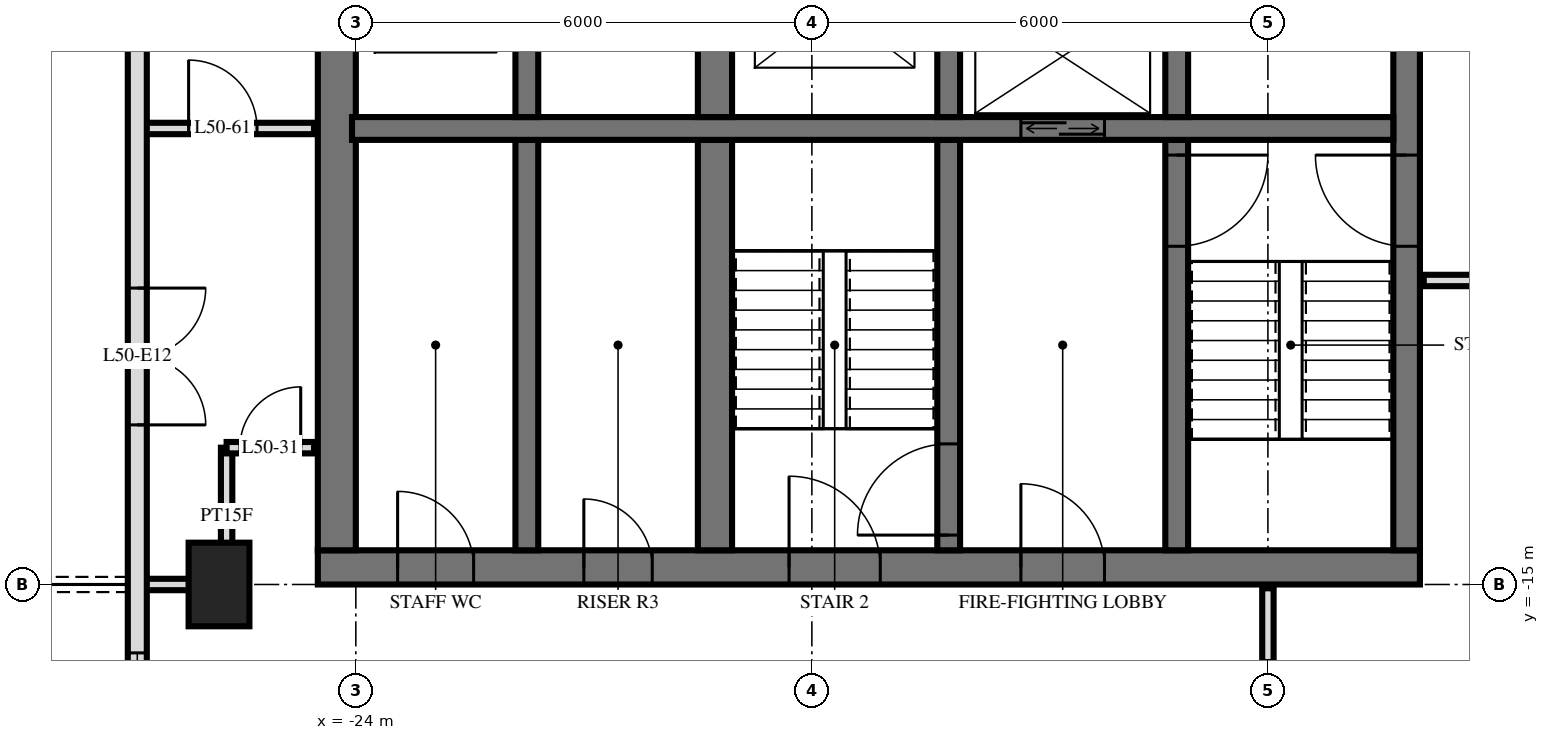
"""IFC4 building model, lengths in metres.
Left out: names, types, materials, properties, quantities, classifications, styles, units other than length and angle.
Written with IfcOpenShell. Run it as: python <this file> out.ifc"""

import sys

from ifc_helpers import new_model, si_unit, direction, frame, frame_2d, origin, origin_2d, place, context, subcontext, project, spatial, rectangle, extrude, element, fill, save


model = new_model("IFC4")
c1 = context("Model", 3, precision=1e-05, world=origin(), true_north=direction((0.0, 1.0)))
c2 = subcontext(c1, "Body", "Model", "MODEL_VIEW")
j1 = project(units=[si_unit("LENGTHUNIT", "METRE"), si_unit("PLANEANGLEUNIT", "RADIAN")], contexts=[c1])
p1 = place(None, origin())
s1 = spatial("IfcSite", under=j1, at=p1, CompositionType="ELEMENT")
p2 = place(p1, origin())
s2 = spatial("IfcBuilding", under=s1, at=p2, CompositionType="ELEMENT")
p3 = place(p2, frame((0.0, 0.0, 194.1)))
s3 = spatial("IfcBuildingStorey", under=s2, at=p3, CompositionType="ELEMENT", Elevation=194.1)
p4 = place(p3, frame((-25.8, -15.0, 0.0), z_axis=(0.0, 0.0, 1.0), x_axis=(0.0, 1.0, 0.0)))
e1 = element("IfcColumn", 1, at=p4, inside=s3, PredefinedType="COLUMN", context=c2, shape_type="SweptSolid", body=[
    extrude(rectangle(XDim=1.1, YDim=0.8, at=origin_2d()), origin(), (0.0, 0.0, 1.0), 3.5),
])
p5 = place(p3, frame((-24.5, -14.775, 0.0), z_axis=(0.0, 0.0, 1.0), x_axis=(1.0, 0.0, 0.0)))
e2 = element("IfcWall", 2, at=p5, inside=s3, PredefinedType="SHEAR", context=c2, shape_type="SweptSolid", body=[
    extrude(rectangle(XDim=14.5, YDim=0.45, at=frame_2d((7.25, 0.0))), origin(), (0.0, 0.0, 1.0), 3.5),
])
p6 = place(p5, frame((6.2, 0.0, 0.0)))
e3 = element("IfcOpeningElement", 3, at=p6, cuts=e2, PredefinedType="OPENING", context=c2, shape_type="SweptSolid", body=[
    extrude(rectangle(XDim=1.2, YDim=2.1, at=frame_2d((0.6, 1.05))), frame((0.0, 0.235, 0.0), z_axis=(0.0, -1.0, 0.0), x_axis=(1.0, 0.0, 0.0)), (0.0, 0.0, 1.0), 0.47),
])
p7 = place(p5, frame((9.25, 0.0, 0.0)))
e4 = element("IfcOpeningElement", 4, at=p7, cuts=e2, PredefinedType="OPENING", context=c2, shape_type="SweptSolid", body=[
    extrude(rectangle(XDim=1.1, YDim=2.1, at=frame_2d((0.55, 1.05))), frame((0.0, 0.235, 0.0), z_axis=(0.0, -1.0, 0.0), x_axis=(1.0, 0.0, 0.0)), (0.0, 0.0, 1.0), 0.47),
])
p8 = place(p5, frame((3.5, 0.0, 0.0)))
e5 = element("IfcOpeningElement", 5, at=p8, cuts=e2, PredefinedType="OPENING", context=c2, shape_type="SweptSolid", body=[
    extrude(rectangle(XDim=0.9, YDim=2.1, at=frame_2d((0.45, 1.05))), frame((0.0, 0.235, 0.0), z_axis=(0.0, -1.0, 0.0), x_axis=(1.0, 0.0, 0.0)), (0.0, 0.0, 1.0), 0.47),
])
p9 = place(p5, frame((1.05, 0.0, 0.0)))
e6 = element("IfcOpeningElement", 6, at=p9, cuts=e2, PredefinedType="OPENING", context=c2, shape_type="SweptSolid", body=[
    extrude(rectangle(XDim=1.0, YDim=2.1, at=frame_2d((0.5, 1.05))), frame((0.0, 0.235, 0.0), z_axis=(0.0, -1.0, 0.0), x_axis=(1.0, 0.0, 0.0)), (0.0, 0.0, 1.0), 0.47),
])
p10 = place(p3, frame((-10.175, -14.55, 0.0), z_axis=(0.0, 0.0, 1.0), x_axis=(0.0, 1.0, 0.0)))
e7 = element("IfcWall", 7, at=p10, inside=s3, PredefinedType="SHEAR", context=c2, shape_type="SweptSolid", body=[
    extrude(rectangle(XDim=14.1, YDim=0.35, at=frame_2d((7.05, 0.0))), origin(), (0.0, 0.0, 1.0), 3.5),
])
p11 = place(p10, frame((8.4, 0.0, 0.0)))
e8 = element("IfcOpeningElement", 8, at=p11, cuts=e7, PredefinedType="OPENING", context=c2, shape_type="SweptSolid", body=[
    extrude(rectangle(XDim=1.4, YDim=2.4, at=frame_2d((0.7, 1.2))), frame((0.0, 0.185, 0.0), z_axis=(0.0, -1.0, 0.0), x_axis=(1.0, 0.0, 0.0)), (0.0, 0.0, 1.0), 0.37),
])
p12 = place(p10, frame((10.0, 0.0, 0.0)))
e9 = element("IfcOpeningElement", 9, at=p12, cuts=e7, PredefinedType="OPENING", context=c2, shape_type="SweptSolid", body=[
    extrude(rectangle(XDim=1.4, YDim=2.4, at=frame_2d((0.7, 1.2))), frame((0.0, 0.185, 0.0), z_axis=(0.0, -1.0, 0.0), x_axis=(1.0, 0.0, 0.0)), (0.0, 0.0, 1.0), 0.37),
])
p13 = place(p10, frame((4.0, 0.0, 0.0)))
e10 = element("IfcOpeningElement", 10, at=p13, cuts=e7, PredefinedType="OPENING", context=c2, shape_type="SweptSolid", body=[
    extrude(rectangle(XDim=1.2, YDim=2.1, at=frame_2d((0.6, 1.05))), frame((0.0, 0.185, 0.0), z_axis=(0.0, -1.0, 0.0), x_axis=(1.0, 0.0, 0.0)), (0.0, 0.0, 1.0), 0.37),
])
p14 = place(p3, frame((-24.25, -14.55, 0.0), z_axis=(0.0, 0.0, 1.0), x_axis=(0.0, 1.0, 0.0)))
e11 = element("IfcWall", 11, at=p14, inside=s3, PredefinedType="SHEAR", context=c2, shape_type="SweptSolid", body=[
    extrude(rectangle(XDim=14.1, YDim=0.5, at=frame_2d((7.05, 0.0))), origin(), (0.0, 0.0, 1.0), 3.5),
])
p15 = place(p3, frame((-24.05, -9.0, 0.0), z_axis=(0.0, 0.0, 1.0), x_axis=(1.0, 0.0, 0.0)))
e12 = element("IfcWall", 12, at=p15, inside=s3, PredefinedType="SHEAR", context=c2, shape_type="SweptSolid", body=[
    extrude(rectangle(XDim=13.7, YDim=0.3, at=frame_2d((6.85, 0.0))), origin(), (0.0, 0.0, 1.0), 3.5),
])
p16 = place(p15, frame((8.8, 0.0, 0.0)))
e13 = element("IfcOpeningElement", 13, at=p16, cuts=e12, PredefinedType="OPENING", context=c2, shape_type="SweptSolid", body=[
    extrude(rectangle(XDim=1.1, YDim=2.1, at=frame_2d((0.55, 1.05))), frame((0.0, 0.16, 0.0), z_axis=(0.0, -1.0, 0.0), x_axis=(1.0, 0.0, 0.0)), (0.0, 0.0, 1.0), 0.32),
])
p17 = place(p3, frame((-13.2, -8.85, 0.0), z_axis=(0.0, 0.0, 1.0), x_axis=(0.0, 1.0, 0.0)))
e14 = element("IfcWall", 14, at=p17, inside=s3, PredefinedType="SHEAR", context=c2, shape_type="SweptSolid", body=[
    extrude(rectangle(XDim=2.3, YDim=0.3, at=frame_2d((1.15, 0.0))), origin(), (0.0, 0.0, 1.0), 3.5),
])
p18 = place(p3, frame((-13.2, -14.55, 0.0), z_axis=(0.0, 0.0, 1.0), x_axis=(0.0, 1.0, 0.0)))
e15 = element("IfcWall", 15, at=p18, inside=s3, PredefinedType="SHEAR", context=c2, shape_type="SweptSolid", body=[
    extrude(rectangle(XDim=5.4, YDim=0.3, at=frame_2d((2.7, 0.0))), origin(), (0.0, 0.0, 1.0), 3.5),
])
p19 = place(p18, frame((4.0, 0.0, 0.0)))
e16 = element("IfcOpeningElement", 16, at=p19, cuts=e15, PredefinedType="OPENING", context=c2, shape_type="SweptSolid", body=[
    extrude(rectangle(XDim=1.2, YDim=2.1, at=frame_2d((0.6, 1.05))), frame((0.0, 0.16, 0.0), z_axis=(0.0, -1.0, 0.0), x_axis=(1.0, 0.0, 0.0)), (0.0, 0.0, 1.0), 0.32),
])
p20 = place(p3, frame((-16.2, -8.85, 0.0), z_axis=(0.0, 0.0, 1.0), x_axis=(0.0, 1.0, 0.0)))
e17 = element("IfcWall", 17, at=p20, inside=s3, PredefinedType="SHEAR", context=c2, shape_type="SweptSolid", body=[
    extrude(rectangle(XDim=2.3, YDim=0.3, at=frame_2d((1.15, 0.0))), origin(), (0.0, 0.0, 1.0), 3.5),
])
p21 = place(p3, frame((-16.2, -14.55, 0.0), z_axis=(0.0, 0.0, 1.0), x_axis=(0.0, 1.0, 0.0)))
e18 = element("IfcWall", 18, at=p21, inside=s3, PredefinedType="SHEAR", context=c2, shape_type="SweptSolid", body=[
    extrude(rectangle(XDim=5.4, YDim=0.3, at=frame_2d((2.7, 0.0))), origin(), (0.0, 0.0, 1.0), 3.5),
])
p22 = place(p21, frame((0.2, 0.0, 0.0)))
e19 = element("IfcOpeningElement", 19, at=p22, cuts=e18, PredefinedType="OPENING", context=c2, shape_type="SweptSolid", body=[
    extrude(rectangle(XDim=1.2, YDim=2.1, at=frame_2d((0.6, 1.05))), frame((0.0, 0.16, 0.0), z_axis=(0.0, -1.0, 0.0), x_axis=(1.0, 0.0, 0.0)), (0.0, 0.0, 1.0), 0.32),
])
p23 = place(p3, frame((-19.275, -8.85, 0.0), z_axis=(0.0, 0.0, 1.0), x_axis=(0.0, 1.0, 0.0)))
e20 = element("IfcWall", 20, at=p23, inside=s3, PredefinedType="SHEAR", context=c2, shape_type="SweptSolid", body=[
    extrude(rectangle(XDim=2.3, YDim=0.45, at=frame_2d((1.15, 0.0))), origin(), (0.0, 0.0, 1.0), 3.5),
])
p24 = place(p3, frame((-19.275, -14.55, 0.0), z_axis=(0.0, 0.0, 1.0), x_axis=(0.0, 1.0, 0.0)))
e21 = element("IfcWall", 21, at=p24, inside=s3, PredefinedType="SHEAR", context=c2, shape_type="SweptSolid", body=[
    extrude(rectangle(XDim=5.4, YDim=0.45, at=frame_2d((2.7, 0.0))), origin(), (0.0, 0.0, 1.0), 3.5),
])
p25 = place(p3, frame((-21.75, -8.85, 0.0), z_axis=(0.0, 0.0, 1.0), x_axis=(0.0, 1.0, 0.0)))
e22 = element("IfcWall", 22, at=p25, inside=s3, PredefinedType="SHEAR", context=c2, shape_type="SweptSolid", body=[
    extrude(rectangle(XDim=2.3, YDim=0.3, at=frame_2d((1.15, 0.0))), origin(), (0.0, 0.0, 1.0), 3.5),
])
p26 = place(p3, frame((-21.75, -14.55, 0.0), z_axis=(0.0, 0.0, 1.0), x_axis=(0.0, 1.0, 0.0)))
e23 = element("IfcWall", 23, at=p26, inside=s3, PredefinedType="SHEAR", context=c2, shape_type="SweptSolid", body=[
    extrude(rectangle(XDim=5.4, YDim=0.3, at=frame_2d((2.7, 0.0))), origin(), (0.0, 0.0, 1.0), 3.5),
])
p27 = place(p3, frame((-26.875, -3.325, 0.0), z_axis=(0.0, 0.0, 1.0), x_axis=(0.0, -1.0, 0.0)))
e24 = element("IfcWall", 24, at=p27, inside=s3, PredefinedType="SOLIDWALL", context=c2, shape_type="SweptSolid", body=[
    extrude(rectangle(XDim=21.551, YDim=0.25, at=frame_2d((10.775, 0.0))), origin(), (0.0, 0.0, 1.0), 3.22),
])
p28 = place(p27, frame((7.775, 0.0, 0.0)))
e25 = element("IfcOpeningElement", 25, at=p28, cuts=e24, PredefinedType="OPENING", context=c2, shape_type="SweptSolid", body=[
    extrude(rectangle(XDim=1.8, YDim=2.4, at=frame_2d((0.9, 1.2))), frame((0.0, 0.135, 0.0), z_axis=(0.0, -1.0, 0.0), x_axis=(1.0, 0.0, 0.0)), (0.0, 0.0, 1.0), 0.27),
])
p29 = place(p27, frame((12.575, 0.0, 0.9)))
e26 = element("IfcOpeningElement", 26, at=p29, cuts=e24, PredefinedType="OPENING", context=c2, shape_type="SweptSolid", body=[
    extrude(rectangle(XDim=1.2, YDim=1.5, at=frame_2d((0.6, 0.75))), frame((0.0, 0.135, 0.0), z_axis=(0.0, -1.0, 0.0), x_axis=(1.0, 0.0, 0.0)), (0.0, 0.0, 1.0), 0.27),
])
p30 = place(p27, frame((15.275, 0.0, 0.0)))
e27 = element("IfcOpeningElement", 27, at=p30, cuts=e24, PredefinedType="OPENING", context=c2, shape_type="SweptSolid", body=[
    extrude(rectangle(XDim=1.8, YDim=2.4, at=frame_2d((0.9, 1.2))), frame((0.0, 0.135, 0.0), z_axis=(0.0, -1.0, 0.0), x_axis=(1.0, 0.0, 0.0)), (0.0, 0.0, 1.0), 0.27),
])
p31 = place(p27, frame((19.325, 0.0, 0.0)))
e28 = element("IfcOpeningElement", 28, at=p31, cuts=e24, PredefinedType="OPENING", context=c2, shape_type="SweptSolid", body=[
    extrude(rectangle(XDim=1.8, YDim=2.4, at=frame_2d((0.9, 1.2))), frame((0.0, 0.135, 0.0), z_axis=(0.0, -1.0, 0.0), x_axis=(1.0, 0.0, 0.0)), (0.0, 0.0, 1.0), 0.27),
])
p32 = place(p3, frame((-12.0, -18.0, 0.0), z_axis=(0.0, 0.0, 1.0), x_axis=(0.0, 1.0, 0.0)))
e29 = element("IfcWall", 29, at=p32, inside=s3, PredefinedType="PARTITIONING", context=c2, shape_type="SweptSolid", body=[
    extrude(rectangle(XDim=2.95, YDim=0.15, at=frame_2d((1.475, 0.0))), origin(), (0.0, 0.0, 1.0), 3.22),
])
p33 = place(p32, frame((1.0, 0.0, 0.0)))
e30 = element("IfcOpeningElement", 30, at=p33, cuts=e29, PredefinedType="OPENING", context=c2, shape_type="SweptSolid", body=[
    extrude(rectangle(XDim=1.0, YDim=2.1, at=frame_2d((0.5, 1.05))), frame((0.0, 0.085, 0.0), z_axis=(0.0, -1.0, 0.0), x_axis=(1.0, 0.0, 0.0)), (0.0, 0.0, 1.0), 0.17),
])
p34 = place(p3, frame((-25.7, -15.0, 0.0), z_axis=(0.0, 0.0, 1.0), x_axis=(0.0, 1.0, 0.0)))
e31 = element("IfcWall", 31, at=p34, inside=s3, PredefinedType="PARTITIONING", context=c2, shape_type="SweptSolid", body=[
    extrude(rectangle(XDim=1.8, YDim=0.15, at=frame_2d((0.9, 0.0))), origin(), (0.0, 0.0, 1.0), 3.22),
])
p35 = place(p3, frame((-26.82, -15.0, 0.0), z_axis=(0.0, 0.0, 1.0), x_axis=(1.0, 0.0, 0.0)))
e32 = element("IfcWall", 32, at=p35, inside=s3, PredefinedType="PARTITIONING", context=c2, shape_type="SweptSolid", body=[
    extrude(rectangle(XDim=1.12, YDim=0.15, at=frame_2d((0.56, 0.0))), origin(), (0.0, 0.0, 1.0), 3.22),
])
p36 = place(p3, frame((-25.7, -13.2, 0.0), z_axis=(0.0, 0.0, 1.0), x_axis=(1.0, 0.0, 0.0)))
e33 = element("IfcWall", 33, at=p36, inside=s3, PredefinedType="PARTITIONING", context=c2, shape_type="SweptSolid", body=[
    extrude(rectangle(XDim=1.15, YDim=0.15, at=frame_2d((0.575, 0.0))), origin(), (0.0, 0.0, 1.0), 3.22),
])
p37 = place(p36, frame((0.175, 0.0, 0.0)))
e34 = element("IfcOpeningElement", 34, at=p37, cuts=e33, PredefinedType="OPENING", context=c2, shape_type="SweptSolid", body=[
    extrude(rectangle(XDim=0.8, YDim=2.1, at=frame_2d((0.4, 1.05))), frame((0.0, 0.085, 0.0), z_axis=(0.0, -1.0, 0.0), x_axis=(1.0, 0.0, 0.0)), (0.0, 0.0, 1.0), 0.17),
])
p38 = place(p3, frame((-9.95, -11.0, 0.0), z_axis=(0.0, 0.0, 1.0), x_axis=(1.0, 0.0, 0.0)))
e35 = element("IfcWall", 35, at=p38, inside=s3, PredefinedType="PARTITIONING", context=c2, shape_type="SweptSolid", body=[
    extrude(rectangle(XDim=19.9, YDim=0.15, at=frame_2d((9.95, 0.0))), origin(), (0.0, 0.0, 1.0), 3.22),
])
p39 = place(p38, frame((9.45, 0.0, 0.0)))
e36 = element("IfcOpeningElement", 36, at=p39, cuts=e35, PredefinedType="OPENING", context=c2, shape_type="SweptSolid", body=[
    extrude(rectangle(XDim=1.0, YDim=2.1, at=frame_2d((0.5, 1.05))), frame((0.0, 0.085, 0.0), z_axis=(0.0, -1.0, 0.0), x_axis=(1.0, 0.0, 0.0)), (0.0, 0.0, 1.0), 0.17),
])
p40 = place(p38, frame((3.45, 0.0, 0.0)))
e37 = element("IfcOpeningElement", 37, at=p40, cuts=e35, PredefinedType="OPENING", context=c2, shape_type="SweptSolid", body=[
    extrude(rectangle(XDim=1.0, YDim=2.1, at=frame_2d((0.5, 1.05))), frame((0.0, 0.085, 0.0), z_axis=(0.0, -1.0, 0.0), x_axis=(1.0, 0.0, 0.0)), (0.0, 0.0, 1.0), 0.17),
])
p41 = place(p3, frame((-26.82, -9.0, 0.0), z_axis=(0.0, 0.0, 1.0), x_axis=(1.0, 0.0, 0.0)))
e38 = element("IfcWall", 38, at=p41, inside=s3, PredefinedType="PARTITIONING", context=c2, shape_type="SweptSolid", body=[
    extrude(rectangle(XDim=2.27, YDim=0.15, at=frame_2d((1.135, 0.0))), origin(), (0.0, 0.0, 1.0), 3.22),
])
p42 = place(p41, frame((0.62, 0.0, 0.0)))
e39 = element("IfcOpeningElement", 39, at=p42, cuts=e38, PredefinedType="OPENING", context=c2, shape_type="SweptSolid", body=[
    extrude(rectangle(XDim=0.9, YDim=2.1, at=frame_2d((0.45, 1.05))), frame((0.0, 0.085, 0.0), z_axis=(0.0, -1.0, 0.0), x_axis=(1.0, 0.0, 0.0)), (0.0, 0.0, 1.0), 0.17),
])
p43 = place(p28, origin())
e40 = element("IfcDoor", 40, at=p43, inside=s3, OperationType="DOUBLE_DOOR_SINGLE_SWING", PredefinedType="DOOR", context=c2, shape_type="SweptSolid", body=[
    extrude(rectangle(XDim=1.8, YDim=2.4, at=frame_2d((0.9, 1.2))), frame((0.0, 0.025, 0.0), z_axis=(0.0, -1.0, 0.0), x_axis=(1.0, 0.0, 0.0)), (0.0, 0.0, 1.0), 0.05),
])
fill(e25, e40)
p44 = place(p29, origin())
e41 = element("IfcWindow", 41, at=p44, inside=s3, PartitioningType="SINGLE_PANEL", PredefinedType="WINDOW", context=c2, shape_type="SweptSolid", body=[
    extrude(rectangle(XDim=1.2, YDim=1.5, at=frame_2d((0.6, 0.75))), frame((0.0, 0.03, 0.0), z_axis=(0.0, -1.0, 0.0), x_axis=(1.0, 0.0, 0.0)), (0.0, 0.0, 1.0), 0.06),
])
fill(e26, e41)
p45 = place(p16, origin())
e42 = element("IfcDoor", 42, at=p45, inside=s3, OperationType="DOUBLE_DOOR_SLIDING", PredefinedType="USERDEFINED", context=c2, shape_type="SweptSolid", body=[
    extrude(rectangle(XDim=1.1, YDim=2.1, at=frame_2d((0.55, 1.05))), frame((0.0, 0.025, 0.0), z_axis=(0.0, -1.0, 0.0), x_axis=(1.0, 0.0, 0.0)), (0.0, 0.0, 1.0), 0.05),
])
fill(e13, e42)
p46 = place(p13, origin())
e43 = element("IfcDoor", 43, at=p46, inside=s3, OperationType="SINGLE_SWING_LEFT", PredefinedType="DOOR", context=c2, shape_type="SweptSolid", body=[
    extrude(rectangle(XDim=1.2, YDim=2.1, at=frame_2d((0.6, 1.05))), frame((0.0, 0.025, 0.0), z_axis=(0.0, -1.0, 0.0), x_axis=(1.0, 0.0, 0.0)), (0.0, 0.0, 1.0), 0.05),
])
fill(e10, e43)
p47 = place(p6, origin())
e44 = element("IfcDoor", 44, at=p47, inside=s3, OperationType="SINGLE_SWING_RIGHT", PredefinedType="DOOR", context=c2, shape_type="SweptSolid", body=[
    extrude(rectangle(XDim=1.2, YDim=2.1, at=frame_2d((0.6, 1.05))), frame((0.0, 0.025, 0.0), z_axis=(0.0, -1.0, 0.0), x_axis=(1.0, 0.0, 0.0)), (0.0, 0.0, 1.0), 0.05),
])
fill(e3, e44)
p48 = place(p7, origin())
e45 = element("IfcDoor", 45, at=p48, inside=s3, OperationType="SINGLE_SWING_RIGHT", PredefinedType="DOOR", context=c2, shape_type="SweptSolid", body=[
    extrude(rectangle(XDim=1.1, YDim=2.1, at=frame_2d((0.55, 1.05))), frame((0.0, 0.025, 0.0), z_axis=(0.0, -1.0, 0.0), x_axis=(1.0, 0.0, 0.0)), (0.0, 0.0, 1.0), 0.05),
])
fill(e4, e45)
p49 = place(p8, origin())
e46 = element("IfcDoor", 46, at=p49, inside=s3, OperationType="SINGLE_SWING_RIGHT", PredefinedType="DOOR", context=c2, shape_type="SweptSolid", body=[
    extrude(rectangle(XDim=0.9, YDim=2.1, at=frame_2d((0.45, 1.05))), frame((0.0, 0.025, 0.0), z_axis=(0.0, -1.0, 0.0), x_axis=(1.0, 0.0, 0.0)), (0.0, 0.0, 1.0), 0.05),
])
fill(e5, e46)
p50 = place(p9, origin())
e47 = element("IfcDoor", 47, at=p50, inside=s3, OperationType="SINGLE_SWING_RIGHT", PredefinedType="DOOR", context=c2, shape_type="SweptSolid", body=[
    extrude(rectangle(XDim=1.0, YDim=2.1, at=frame_2d((0.5, 1.05))), frame((0.0, 0.025, 0.0), z_axis=(0.0, -1.0, 0.0), x_axis=(1.0, 0.0, 0.0)), (0.0, 0.0, 1.0), 0.05),
])
fill(e6, e47)
p51 = place(p19, frame((0.6, 0.0, 0.0), z_axis=(0.0, 0.0, 1.0), x_axis=(-1.0, 0.0, 0.0)))
e48 = element("IfcDoor", 48, at=p51, inside=s3, OperationType="SINGLE_SWING_RIGHT", PredefinedType="DOOR", context=c2, shape_type="SweptSolid", body=[
    extrude(rectangle(XDim=1.2, YDim=2.1, at=frame_2d((0.0, 1.05))), frame((0.0, -0.025, 0.0), z_axis=(0.0, 1.0, 0.0), x_axis=(-1.0, 0.0, 0.0)), (0.0, 0.0, 1.0), 0.05),
])
fill(e16, e48)
p52 = place(p22, origin())
e49 = element("IfcDoor", 49, at=p52, inside=s3, OperationType="SINGLE_SWING_RIGHT", PredefinedType="DOOR", context=c2, shape_type="SweptSolid", body=[
    extrude(rectangle(XDim=1.2, YDim=2.1, at=frame_2d((0.6, 1.05))), frame((0.0, 0.025, 0.0), z_axis=(0.0, -1.0, 0.0), x_axis=(1.0, 0.0, 0.0)), (0.0, 0.0, 1.0), 0.05),
])
fill(e19, e49)
p53 = place(p37, origin())
e50 = element("IfcDoor", 50, at=p53, inside=s3, OperationType="SINGLE_SWING_LEFT", PredefinedType="DOOR", context=c2, shape_type="SweptSolid", body=[
    extrude(rectangle(XDim=0.8, YDim=2.1, at=frame_2d((0.4, 1.05))), frame((0.0, 0.025, 0.0), z_axis=(0.0, -1.0, 0.0), x_axis=(1.0, 0.0, 0.0)), (0.0, 0.0, 1.0), 0.05),
])
fill(e34, e50)
p54 = place(p42, origin())
e51 = element("IfcDoor", 51, at=p54, inside=s3, OperationType="SINGLE_SWING_RIGHT", PredefinedType="DOOR", context=c2, shape_type="SweptSolid", body=[
    extrude(rectangle(XDim=0.9, YDim=2.1, at=frame_2d((0.45, 1.05))), frame((0.0, 0.025, 0.0), z_axis=(0.0, -1.0, 0.0), x_axis=(1.0, 0.0, 0.0)), (0.0, 0.0, 1.0), 0.05),
])
fill(e39, e51)
save(model, sys.argv[1])
